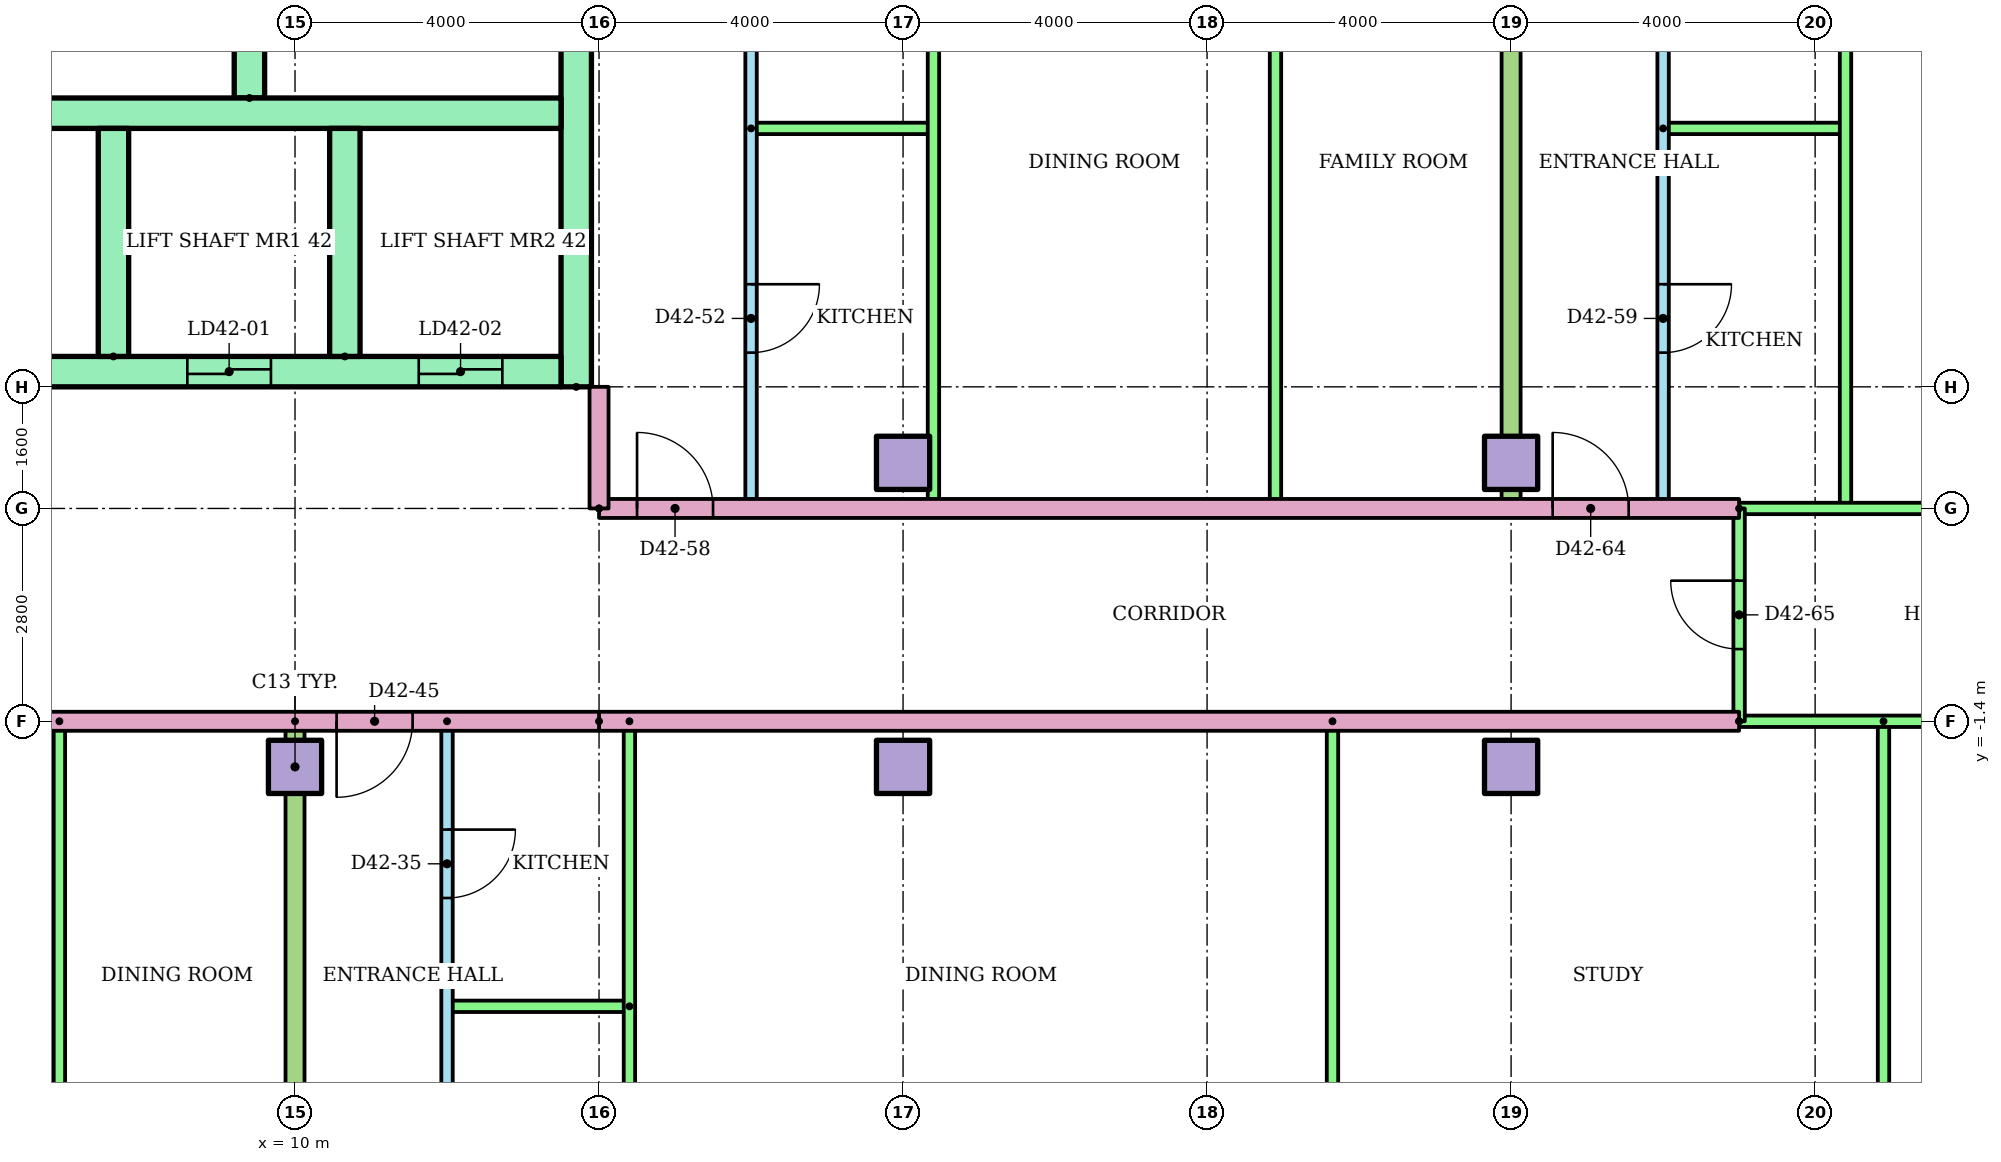
"""IFC4 building model, lengths in metres.
Left out: names, types, materials, properties, quantities, classifications, styles, units other than length and angle.
Written with IfcOpenShell. Run it as: python <this file> out.ifc"""

import sys

from ifc_helpers import new_model, si_unit, direction, frame, frame_2d, origin, origin_2d, place, context, subcontext, project, spatial, rectangle, extrude, element, fill, save


model = new_model("IFC4")
c1 = context("Model", 3, precision=1e-05, world=origin(), true_north=direction((0.0, 1.0)))
c2 = subcontext(c1, "Body", "Model", "MODEL_VIEW")
j1 = project(units=[si_unit("LENGTHUNIT", "METRE"), si_unit("PLANEANGLEUNIT", "RADIAN")], contexts=[c1])
p1 = place(None, origin())
s1 = spatial("IfcSite", under=j1, at=p1, CompositionType="ELEMENT")
p2 = place(p1, origin())
s2 = spatial("IfcBuilding", under=s1, at=p2, CompositionType="ELEMENT")
p3 = place(p2, frame((0.0, 0.0, 165.3)))
s3 = spatial("IfcBuildingStorey", under=s2, at=p3, CompositionType="ELEMENT", Elevation=165.3)
for number, where in (
    (1, (10.0, -2.0, 0.0)),
    (2, (18.0, -2.0, 0.0)),
    (3, (26.0, -2.0, 0.0)),
    (4, (18.0, 2.0, 0.0)),
    (5, (26.0, 2.0, 0.0)),
):
    element("IfcColumn", number, at=place(p3, frame(where)), inside=s3, PredefinedType="COLUMN", context=c2, shape_type="SweptSolid", body=[
        extrude(rectangle(XDim=0.7, YDim=0.7, at=origin_2d()), origin(), (0.0, 0.0, 1.0), 3.2),
    ])
p4 = place(p3, frame((13.7, 3.0, 0.0), z_axis=(0.0, 0.0, 1.0), x_axis=(0.0, 1.0, 0.0)))
e6 = element("IfcWall", 6, at=p4, inside=s3, PredefinedType="SHEAR", context=c2, shape_type="SweptSolid", body=[
    extrude(rectangle(XDim=17.0, YDim=0.4, at=frame_2d((8.5, 0.0))), origin(), (0.0, 0.0, 1.0), 2.92),
])
p5 = place(p3, frame((9.4, 6.8, 0.0), z_axis=(0.0, 0.0, 1.0), x_axis=(0.0, 1.0, 0.0)))
e7 = element("IfcWall", 7, at=p5, inside=s3, PredefinedType="SHEAR", context=c2, shape_type="SweptSolid", body=[
    extrude(rectangle(XDim=12.7, YDim=0.4, at=frame_2d((6.35, 0.0))), origin(), (0.0, 0.0, 1.0), 2.92),
])
p6 = place(p5, frame((1.15, 0.0, 0.0)))
e8 = element("IfcOpeningElement", 8, at=p6, cuts=e7, PredefinedType="OPENING", context=c2, shape_type="SweptSolid", body=[
    extrude(rectangle(XDim=1.0, YDim=2.1, at=frame_2d((0.5, 1.05))), frame((0.0, 0.21, 0.0), z_axis=(0.0, -1.0, 0.0), x_axis=(1.0, 0.0, 0.0)), (0.0, 0.0, 1.0), 0.42),
])
p7 = place(p5, frame((7.925, 0.0, 0.0)))
e9 = element("IfcOpeningElement", 9, at=p7, cuts=e7, PredefinedType="OPENING", context=c2, shape_type="SweptSolid", body=[
    extrude(rectangle(XDim=1.0, YDim=2.1, at=frame_2d((0.5, 1.05))), frame((0.0, 0.21, 0.0), z_axis=(0.0, -1.0, 0.0), x_axis=(1.0, 0.0, 0.0)), (0.0, 0.0, 1.0), 0.42),
])
p8 = place(p3, frame((-13.5, 3.2, 0.0)))
e10 = element("IfcWall", 10, at=p8, inside=s3, PredefinedType="SHEAR", context=c2, shape_type="SweptSolid", body=[
    extrude(rectangle(XDim=27.0, YDim=0.4, at=frame_2d((13.5, 0.0))), origin(), (0.0, 0.0, 1.0), 2.92),
])
p9 = place(p8, frame((22.083, 0.0, 0.0)))
e11 = element("IfcOpeningElement", 11, at=p9, cuts=e10, PredefinedType="OPENING", context=c2, shape_type="SweptSolid", body=[
    extrude(rectangle(XDim=1.1, YDim=2.1, at=frame_2d((0.55, 1.05))), frame((0.0, 0.21, 0.0), z_axis=(0.0, -1.0, 0.0), x_axis=(1.0, 0.0, 0.0)), (0.0, 0.0, 1.0), 0.42),
])
p10 = place(p8, frame((25.128, 0.0, 0.0)))
e12 = element("IfcOpeningElement", 12, at=p10, cuts=e10, PredefinedType="OPENING", context=c2, shape_type="SweptSolid", body=[
    extrude(rectangle(XDim=1.1, YDim=2.1, at=frame_2d((0.55, 1.05))), frame((0.0, 0.21, 0.0), z_axis=(0.0, -1.0, 0.0), x_axis=(1.0, 0.0, 0.0)), (0.0, 0.0, 1.0), 0.42),
])
p11 = place(p8, frame((12.6, 0.0, 0.0)))
e13 = element("IfcOpeningElement", 13, at=p11, cuts=e10, PredefinedType="OPENING", context=c2, shape_type="SweptSolid", body=[
    extrude(rectangle(XDim=1.8, YDim=2.1, at=frame_2d((0.9, 1.05))), frame((0.0, 0.21, 0.0), z_axis=(0.0, -1.0, 0.0), x_axis=(1.0, 0.0, 0.0)), (0.0, 0.0, 1.0), 0.42),
])
p12 = place(p3, frame((1.522, 6.6, 0.0)))
e14 = element("IfcWall", 14, at=p12, inside=s3, PredefinedType="SHEAR", context=c2, shape_type="SweptSolid", body=[
    extrude(rectangle(XDim=11.978, YDim=0.4, at=frame_2d((5.989, 0.0))), origin(), (0.0, 0.0, 1.0), 2.92),
])
p13 = place(p12, frame((2.544, 0.0, 0.0)))
e15 = element("IfcOpeningElement", 15, at=p13, cuts=e14, PredefinedType="OPENING", context=c2, shape_type="SweptSolid", body=[
    extrude(rectangle(XDim=1.0, YDim=2.1, at=frame_2d((0.5, 1.05))), frame((0.0, 0.21, 0.0), z_axis=(0.0, -1.0, 0.0), x_axis=(1.0, 0.0, 0.0)), (0.0, 0.0, 1.0), 0.42),
])
for number, where, z_axis, x_axis in (
    (16, (7.611, 3.4, 0.0), (0.0, 0.0, 1.0), (0.0, 1.0, 0.0)),
    (17, (10.656, 3.4, 0.0), (0.0, 0.0, 1.0), (0.0, 1.0, 0.0)),
):
    element("IfcWall", number, at=place(p3, frame(where, z_axis=z_axis, x_axis=x_axis)), inside=s3, PredefinedType="SHEAR", context=c2, shape_type="SweptSolid", body=[
        extrude(rectangle(XDim=3.0, YDim=0.4, at=frame_2d((1.5, 0.0))), origin(), (0.0, 0.0, 1.0), 2.92),
    ])
p14 = place(p3, frame((6.9, -1.4, 0.0), z_axis=(0.0, 0.0, 1.0), x_axis=(0.0, -1.0, 0.0)))
e18 = element("IfcWall", 18, at=p14, inside=s3, PredefinedType="PARTITIONING", context=c2, shape_type="SweptSolid", body=[
    extrude(rectangle(XDim=6.7, YDim=0.15, at=frame_2d((3.35, 0.0))), origin(), (0.0, 0.0, 1.0), 2.4),
])
p15 = place(p3, frame((12.0, -1.4, 0.0), z_axis=(0.0, 0.0, 1.0), x_axis=(0.0, -1.0, 0.0)))
e19 = element("IfcWall", 19, at=p15, inside=s3, PredefinedType="PARTITIONING", context=c2, shape_type="SweptSolid", body=[
    extrude(rectangle(XDim=6.7, YDim=0.15, at=frame_2d((3.35, 0.0))), origin(), (0.0, 0.0, 1.0), 2.4),
])
p16 = place(p15, frame((1.425, 0.0, 0.0)))
e20 = element("IfcOpeningElement", 20, at=p16, cuts=e19, PredefinedType="OPENING", context=c2, shape_type="SweptSolid", body=[
    extrude(rectangle(XDim=0.9, YDim=2.1, at=frame_2d((0.45, 1.05))), frame((0.0, 0.085, 0.0), z_axis=(0.0, -1.0, 0.0), x_axis=(1.0, 0.0, 0.0)), (0.0, 0.0, 1.0), 0.17),
])
p17 = place(p15, frame((4.825, 0.0, 0.0)))
e21 = element("IfcOpeningElement", 21, at=p17, cuts=e19, PredefinedType="OPENING", context=c2, shape_type="SweptSolid", body=[
    extrude(rectangle(XDim=0.8, YDim=2.1, at=frame_2d((0.4, 1.05))), frame((0.0, 0.085, 0.0), z_axis=(0.0, -1.0, 0.0), x_axis=(1.0, 0.0, 0.0)), (0.0, 0.0, 1.0), 0.17),
])
p18 = place(p3, frame((14.4, -5.15, 0.0), z_axis=(0.0, 0.0, 1.0), x_axis=(-1.0, 0.0, 0.0)))
e22 = element("IfcWall", 22, at=p18, inside=s3, PredefinedType="PARTITIONING", context=c2, shape_type="SweptSolid", body=[
    extrude(rectangle(XDim=2.4, YDim=0.15, at=frame_2d((1.2, 0.0))), origin(), (0.0, 0.0, 1.0), 2.4),
])
for number, where, z_axis, x_axis in (
    (23, (14.4, -1.4, 0.0), (0.0, 0.0, 1.0), (0.0, -1.0, 0.0)),
    (24, (23.65, -1.4, 0.0), (0.0, 0.0, 1.0), (0.0, -1.0, 0.0)),
    (25, (30.9, -1.4, 0.0), (0.0, 0.0, 1.0), (0.0, -1.0, 0.0)),
):
    element("IfcWall", number, at=place(p3, frame(where, z_axis=z_axis, x_axis=x_axis)), inside=s3, PredefinedType="PARTITIONING", context=c2, shape_type="SweptSolid", body=[
        extrude(rectangle(XDim=6.7, YDim=0.15, at=frame_2d((3.35, 0.0))), origin(), (0.0, 0.0, 1.0), 2.4),
    ])
p19 = place(p3, frame((10.0, -1.4, 0.0), z_axis=(0.0, 0.0, 1.0), x_axis=(0.0, -1.0, 0.0)))
e26 = element("IfcWall", 26, at=p19, inside=s3, PredefinedType="PARTITIONING", context=c2, shape_type="SweptSolid", body=[
    extrude(rectangle(XDim=15.01, YDim=0.25, at=frame_2d((7.505, 0.0))), origin(), (0.0, 0.0, 1.0), 2.4),
])
p20 = place(p3, frame((29.0, -1.4, 0.0), z_axis=(0.0, 0.0, 1.0), x_axis=(-1.0, 0.0, 0.0)))
e27 = element("IfcWall", 27, at=p20, inside=s3, PredefinedType="PARTITIONING", context=c2, shape_type="SweptSolid", body=[
    extrude(rectangle(XDim=15.0, YDim=0.25, at=frame_2d((7.5, 0.0))), origin(), (0.0, 0.0, 1.0), 2.4),
])
p21 = place(p3, frame((36.82, -1.4, 0.0), z_axis=(0.0, 0.0, 1.0), x_axis=(-1.0, 0.0, 0.0)))
e28 = element("IfcWall", 28, at=p21, inside=s3, PredefinedType="PARTITIONING", context=c2, shape_type="SweptSolid", body=[
    extrude(rectangle(XDim=7.82, YDim=0.15, at=frame_2d((3.91, 0.0))), origin(), (0.0, 0.0, 1.0), 2.4),
])
p22 = place(p3, frame((16.0, 10.5, 0.0), z_axis=(0.0, 0.0, 1.0), x_axis=(0.0, -1.0, 0.0)))
e29 = element("IfcWall", 29, at=p22, inside=s3, PredefinedType="PARTITIONING", context=c2, shape_type="SweptSolid", body=[
    extrude(rectangle(XDim=9.1, YDim=0.15, at=frame_2d((4.55, 0.0))), origin(), (0.0, 0.0, 1.0), 2.4),
])
p23 = place(p22, frame((6.15, 0.0, 0.0)))
e30 = element("IfcOpeningElement", 30, at=p23, cuts=e29, PredefinedType="OPENING", context=c2, shape_type="SweptSolid", body=[
    extrude(rectangle(XDim=0.9, YDim=2.1, at=frame_2d((0.45, 1.05))), frame((0.0, 0.085, 0.0), z_axis=(0.0, -1.0, 0.0), x_axis=(1.0, 0.0, 0.0)), (0.0, 0.0, 1.0), 0.17),
])
p24 = place(p22, frame((1.65, 0.0, 0.0)))
e31 = element("IfcOpeningElement", 31, at=p24, cuts=e29, PredefinedType="OPENING", context=c2, shape_type="SweptSolid", body=[
    extrude(rectangle(XDim=0.8, YDim=2.1, at=frame_2d((0.4, 1.05))), frame((0.0, 0.085, 0.0), z_axis=(0.0, -1.0, 0.0), x_axis=(1.0, 0.0, 0.0)), (0.0, 0.0, 1.0), 0.17),
])
p25 = place(p3, frame((16.0, 6.4, 0.0)))
e32 = element("IfcWall", 32, at=p25, inside=s3, PredefinedType="PARTITIONING", context=c2, shape_type="SweptSolid", body=[
    extrude(rectangle(XDim=2.4, YDim=0.15, at=frame_2d((1.2, 0.0))), origin(), (0.0, 0.0, 1.0), 2.4),
])
for number, where, z_axis, x_axis in (
    (33, (18.4, 10.5, 0.0), (0.0, 0.0, 1.0), (0.0, -1.0, 0.0)),
    (34, (22.9, 10.5, 0.0), (0.0, 0.0, 1.0), (0.0, -1.0, 0.0)),
):
    element("IfcWall", number, at=place(p3, frame(where, z_axis=z_axis, x_axis=x_axis)), inside=s3, PredefinedType="PARTITIONING", context=c2, shape_type="SweptSolid", body=[
        extrude(rectangle(XDim=9.1, YDim=0.15, at=frame_2d((4.55, 0.0))), origin(), (0.0, 0.0, 1.0), 2.4),
    ])
p26 = place(p3, frame((28.0, 10.5, 0.0), z_axis=(0.0, 0.0, 1.0), x_axis=(0.0, -1.0, 0.0)))
e35 = element("IfcWall", 35, at=p26, inside=s3, PredefinedType="PARTITIONING", context=c2, shape_type="SweptSolid", body=[
    extrude(rectangle(XDim=9.1, YDim=0.15, at=frame_2d((4.55, 0.0))), origin(), (0.0, 0.0, 1.0), 2.4),
])
p27 = place(p26, frame((6.15, 0.0, 0.0)))
e36 = element("IfcOpeningElement", 36, at=p27, cuts=e35, PredefinedType="OPENING", context=c2, shape_type="SweptSolid", body=[
    extrude(rectangle(XDim=0.9, YDim=2.1, at=frame_2d((0.45, 1.05))), frame((0.0, 0.085, 0.0), z_axis=(0.0, -1.0, 0.0), x_axis=(1.0, 0.0, 0.0)), (0.0, 0.0, 1.0), 0.17),
])
p28 = place(p26, frame((1.65, 0.0, 0.0)))
e37 = element("IfcOpeningElement", 37, at=p28, cuts=e35, PredefinedType="OPENING", context=c2, shape_type="SweptSolid", body=[
    extrude(rectangle(XDim=0.8, YDim=2.1, at=frame_2d((0.4, 1.05))), frame((0.0, 0.085, 0.0), z_axis=(0.0, -1.0, 0.0), x_axis=(1.0, 0.0, 0.0)), (0.0, 0.0, 1.0), 0.17),
])
p29 = place(p3, frame((28.0, 6.4, 0.0)))
e38 = element("IfcWall", 38, at=p29, inside=s3, PredefinedType="PARTITIONING", context=c2, shape_type="SweptSolid", body=[
    extrude(rectangle(XDim=2.4, YDim=0.15, at=frame_2d((1.2, 0.0))), origin(), (0.0, 0.0, 1.0), 2.4),
])
p30 = place(p3, frame((30.4, 10.5, 0.0), z_axis=(0.0, 0.0, 1.0), x_axis=(0.0, -1.0, 0.0)))
e39 = element("IfcWall", 39, at=p30, inside=s3, PredefinedType="PARTITIONING", context=c2, shape_type="SweptSolid", body=[
    extrude(rectangle(XDim=9.1, YDim=0.15, at=frame_2d((4.55, 0.0))), origin(), (0.0, 0.0, 1.0), 2.4),
])
p31 = place(p3, frame((26.0, 18.821, 0.0), z_axis=(0.0, 0.0, 1.0), x_axis=(0.0, -1.0, 0.0)))
e40 = element("IfcWall", 40, at=p31, inside=s3, PredefinedType="PARTITIONING", context=c2, shape_type="SweptSolid", body=[
    extrude(rectangle(XDim=17.421, YDim=0.25, at=frame_2d((8.71, 0.0))), origin(), (0.0, 0.0, 1.0), 2.4),
])
p32 = place(p3, frame((14.0, 1.4, 0.0)))
e41 = element("IfcWall", 41, at=p32, inside=s3, PredefinedType="PARTITIONING", context=c2, shape_type="SweptSolid", body=[
    extrude(rectangle(XDim=15.0, YDim=0.25, at=frame_2d((7.5, 0.0))), origin(), (0.0, 0.0, 1.0), 2.4),
])
p33 = place(p32, frame((0.5, 0.0, 0.0)))
e42 = element("IfcOpeningElement", 42, at=p33, cuts=e41, PredefinedType="OPENING", context=c2, shape_type="SweptSolid", body=[
    extrude(rectangle(XDim=1.0, YDim=2.1, at=frame_2d((0.5, 1.05))), frame((0.0, 0.135, 0.0), z_axis=(0.0, -1.0, 0.0), x_axis=(1.0, 0.0, 0.0)), (0.0, 0.0, 1.0), 0.27),
])
p34 = place(p32, frame((12.547, 0.0, 0.0)))
e43 = element("IfcOpeningElement", 43, at=p34, cuts=e41, PredefinedType="OPENING", context=c2, shape_type="SweptSolid", body=[
    extrude(rectangle(XDim=1.0, YDim=2.1, at=frame_2d((0.5, 1.05))), frame((0.0, 0.135, 0.0), z_axis=(0.0, -1.0, 0.0), x_axis=(1.0, 0.0, 0.0)), (0.0, 0.0, 1.0), 0.27),
])
p35 = place(p3, frame((29.0, 1.4, 0.0)))
e44 = element("IfcWall", 44, at=p35, inside=s3, PredefinedType="PARTITIONING", context=c2, shape_type="SweptSolid", body=[
    extrude(rectangle(XDim=7.82, YDim=0.15, at=frame_2d((3.91, 0.0))), origin(), (0.0, 0.0, 1.0), 2.4),
])
p36 = place(p3, frame((29.0, -1.4, 0.0), z_axis=(0.0, 0.0, 1.0), x_axis=(0.0, 1.0, 0.0)))
e45 = element("IfcWall", 45, at=p36, inside=s3, PredefinedType="PARTITIONING", context=c2, shape_type="SweptSolid", body=[
    extrude(rectangle(XDim=2.8, YDim=0.15, at=frame_2d((1.4, 0.0))), origin(), (0.0, 0.0, 1.0), 2.4),
])
p37 = place(p36, frame((0.95, 0.0, 0.0)))
e46 = element("IfcOpeningElement", 46, at=p37, cuts=e45, PredefinedType="OPENING", context=c2, shape_type="SweptSolid", body=[
    extrude(rectangle(XDim=0.9, YDim=2.1, at=frame_2d((0.45, 1.05))), frame((0.0, 0.085, 0.0), z_axis=(0.0, -1.0, 0.0), x_axis=(1.0, 0.0, 0.0)), (0.0, 0.0, 1.0), 0.17),
])
p38 = place(p3, frame((14.0, -1.4, 0.0), z_axis=(0.0, 0.0, 1.0), x_axis=(-1.0, 0.0, 0.0)))
e47 = element("IfcWall", 47, at=p38, inside=s3, PredefinedType="PARTITIONING", context=c2, shape_type="SweptSolid", body=[
    extrude(rectangle(XDim=28.0, YDim=0.25, at=frame_2d((14.0, 0.0))), origin(), (0.0, 0.0, 1.0), 2.4),
])
p39 = place(p38, frame((20.547, 0.0, 0.0)))
e48 = element("IfcOpeningElement", 48, at=p39, cuts=e47, PredefinedType="OPENING", context=c2, shape_type="SweptSolid", body=[
    extrude(rectangle(XDim=1.0, YDim=2.1, at=frame_2d((0.5, 1.05))), frame((0.0, 0.135, 0.0), z_axis=(0.0, -1.0, 0.0), x_axis=(1.0, 0.0, 0.0)), (0.0, 0.0, 1.0), 0.27),
])
p40 = place(p38, frame((18.453, 0.0, 0.0)))
e49 = element("IfcOpeningElement", 49, at=p40, cuts=e47, PredefinedType="OPENING", context=c2, shape_type="SweptSolid", body=[
    extrude(rectangle(XDim=1.0, YDim=2.1, at=frame_2d((0.5, 1.05))), frame((0.0, 0.135, 0.0), z_axis=(0.0, -1.0, 0.0), x_axis=(1.0, 0.0, 0.0)), (0.0, 0.0, 1.0), 0.27),
])
p41 = place(p38, frame((2.453, 0.0, 0.0)))
e50 = element("IfcOpeningElement", 50, at=p41, cuts=e47, PredefinedType="OPENING", context=c2, shape_type="SweptSolid", body=[
    extrude(rectangle(XDim=1.0, YDim=2.1, at=frame_2d((0.5, 1.05))), frame((0.0, 0.135, 0.0), z_axis=(0.0, -1.0, 0.0), x_axis=(1.0, 0.0, 0.0)), (0.0, 0.0, 1.0), 0.27),
])
p42 = place(p3, frame((14.0, 1.4, 0.0), z_axis=(0.0, 0.0, 1.0), x_axis=(0.0, 1.0, 0.0)))
e51 = element("IfcWall", 51, at=p42, inside=s3, PredefinedType="PARTITIONING", context=c2, shape_type="SweptSolid", body=[
    extrude(rectangle(XDim=1.6, YDim=0.25, at=frame_2d((0.8, 0.0))), origin(), (0.0, 0.0, 1.0), 2.4),
])
p43 = place(p9, origin())
e52 = element("IfcDoor", 52, at=p43, inside=s3, OperationType="SLIDING_TO_LEFT", PredefinedType="DOOR", context=c2, shape_type="SweptSolid", body=[
    extrude(rectangle(XDim=1.1, YDim=2.1, at=frame_2d((0.55, 1.05))), frame((0.0, 0.025, 0.0), z_axis=(0.0, -1.0, 0.0), x_axis=(1.0, 0.0, 0.0)), (0.0, 0.0, 1.0), 0.05),
])
fill(e11, e52)
p44 = place(p10, origin())
e53 = element("IfcDoor", 53, at=p44, inside=s3, OperationType="SLIDING_TO_LEFT", PredefinedType="DOOR", context=c2, shape_type="SweptSolid", body=[
    extrude(rectangle(XDim=1.1, YDim=2.1, at=frame_2d((0.55, 1.05))), frame((0.0, 0.025, 0.0), z_axis=(0.0, -1.0, 0.0), x_axis=(1.0, 0.0, 0.0)), (0.0, 0.0, 1.0), 0.05),
])
fill(e12, e53)
p45 = place(p16, origin())
e54 = element("IfcDoor", 54, at=p45, inside=s3, OperationType="SINGLE_SWING_LEFT", PredefinedType="DOOR", context=c2, shape_type="SweptSolid", body=[
    extrude(rectangle(XDim=0.9, YDim=2.1, at=frame_2d((0.45, 1.05))), frame((0.0, 0.025, 0.0), z_axis=(0.0, -1.0, 0.0), x_axis=(1.0, 0.0, 0.0)), (0.0, 0.0, 1.0), 0.05),
])
fill(e20, e54)
p46 = place(p41, origin())
e55 = element("IfcDoor", 55, at=p46, inside=s3, OperationType="SINGLE_SWING_RIGHT", PredefinedType="DOOR", context=c2, shape_type="SweptSolid", body=[
    extrude(rectangle(XDim=1.0, YDim=2.1, at=frame_2d((0.5, 1.05))), frame((0.0, 0.025, 0.0), z_axis=(0.0, -1.0, 0.0), x_axis=(1.0, 0.0, 0.0)), (0.0, 0.0, 1.0), 0.05),
])
fill(e50, e55)
p47 = place(p23, origin())
e56 = element("IfcDoor", 56, at=p47, inside=s3, OperationType="SINGLE_SWING_LEFT", PredefinedType="DOOR", context=c2, shape_type="SweptSolid", body=[
    extrude(rectangle(XDim=0.9, YDim=2.1, at=frame_2d((0.45, 1.05))), frame((0.0, 0.025, 0.0), z_axis=(0.0, -1.0, 0.0), x_axis=(1.0, 0.0, 0.0)), (0.0, 0.0, 1.0), 0.05),
])
fill(e30, e56)
p48 = place(p33, origin())
e57 = element("IfcDoor", 57, at=p48, inside=s3, OperationType="SINGLE_SWING_LEFT", PredefinedType="DOOR", context=c2, shape_type="SweptSolid", body=[
    extrude(rectangle(XDim=1.0, YDim=2.1, at=frame_2d((0.5, 1.05))), frame((0.0, 0.025, 0.0), z_axis=(0.0, -1.0, 0.0), x_axis=(1.0, 0.0, 0.0)), (0.0, 0.0, 1.0), 0.05),
])
fill(e42, e57)
p49 = place(p27, origin())
e58 = element("IfcDoor", 58, at=p49, inside=s3, OperationType="SINGLE_SWING_LEFT", PredefinedType="DOOR", context=c2, shape_type="SweptSolid", body=[
    extrude(rectangle(XDim=0.9, YDim=2.1, at=frame_2d((0.45, 1.05))), frame((0.0, 0.025, 0.0), z_axis=(0.0, -1.0, 0.0), x_axis=(1.0, 0.0, 0.0)), (0.0, 0.0, 1.0), 0.05),
])
fill(e36, e58)
p50 = place(p34, origin())
e59 = element("IfcDoor", 59, at=p50, inside=s3, OperationType="SINGLE_SWING_LEFT", PredefinedType="DOOR", context=c2, shape_type="SweptSolid", body=[
    extrude(rectangle(XDim=1.0, YDim=2.1, at=frame_2d((0.5, 1.05))), frame((0.0, 0.025, 0.0), z_axis=(0.0, -1.0, 0.0), x_axis=(1.0, 0.0, 0.0)), (0.0, 0.0, 1.0), 0.05),
])
fill(e43, e59)
p51 = place(p37, origin())
e60 = element("IfcDoor", 60, at=p51, inside=s3, OperationType="SINGLE_SWING_RIGHT", PredefinedType="DOOR", context=c2, shape_type="SweptSolid", body=[
    extrude(rectangle(XDim=0.9, YDim=2.1, at=frame_2d((0.45, 1.05))), frame((0.0, 0.025, 0.0), z_axis=(0.0, -1.0, 0.0), x_axis=(1.0, 0.0, 0.0)), (0.0, 0.0, 1.0), 0.05),
])
fill(e46, e60)
save(model, sys.argv[1])
